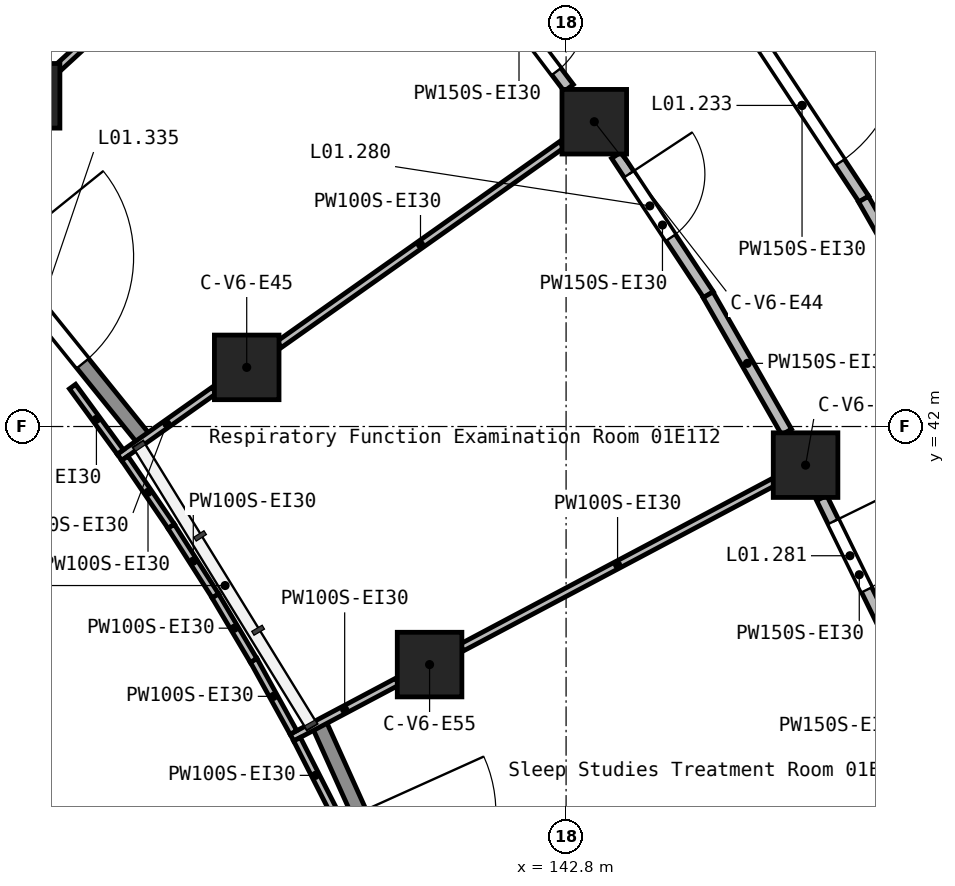
"""IFC4 building model, lengths in metres.
Left out: names, types, materials, properties, quantities, classifications, styles, units other than length and angle.
Written with IfcOpenShell. Run it as: python <this file> out.ifc"""

import sys

from ifc_helpers import new_model, si_unit, direction, frame, frame_2d, origin, origin_2d, place, context, subcontext, project, spatial, rectangle, extrude, element, fill, save


model = new_model("IFC4")
c1 = context("Model", 3, precision=1e-05, world=origin(), true_north=direction((0.0, 1.0)))
c2 = subcontext(c1, "Body", "Model", "MODEL_VIEW")
j1 = project(units=[si_unit("LENGTHUNIT", "METRE"), si_unit("PLANEANGLEUNIT", "RADIAN")], contexts=[c1])
p1 = place(None, origin())
s1 = spatial("IfcSite", under=j1, at=p1, CompositionType="ELEMENT")
p2 = place(p1, origin())
s2 = spatial("IfcBuilding", under=s1, at=p2, CompositionType="ELEMENT")
p3 = place(p2, frame((0.0, 0.0, 5.4)))
s3 = spatial("IfcBuildingStorey", under=s2, at=p3, CompositionType="ELEMENT", Elevation=5.4)
for number, where, z_axis, x_axis in (
    (1, (135.715, 46.351, 0.0), (0.0, 0.0, 1.0), (1.0, 0.0, 0.0)),
    (2, (138.598, 42.778, 0.0), (0.0, 0.0, 1.0), (1.0, 0.0, 0.0)),
    (3, (141.004, 38.868, 0.0), (0.0, 0.0, 1.0), (1.0, 0.0, 0.0)),
    (4, (143.171, 46.01, 0.0), (0.0, 0.0, 1.0), (1.0, 0.0, 0.0)),
    (5, (145.951, 41.492, 0.0), (0.0, 0.0, 1.0), (1.0, 0.0, 0.0)),
):
    element("IfcColumn", number, at=place(p3, frame(where, z_axis=z_axis, x_axis=x_axis)), inside=s3, PredefinedType="COLUMN", context=c2, shape_type="SweptSolid", body=[
        extrude(rectangle(XDim=0.85, YDim=0.85, at=origin_2d()), origin(), (0.0, 0.0, 1.0), 4.5),
    ])
p4 = place(p3, frame((134.504, 45.23, 0.0), z_axis=(0.0, 0.0, 1.0), x_axis=(0.628043022297, -0.778178618406, 0.0)))
e6 = element("IfcWall", 6, at=p4, inside=s3, PredefinedType="STANDARD", context=c2, shape_type="SweptSolid", body=[
    extrude(rectangle(XDim=4.368, YDim=0.2, at=frame_2d((2.184, 0.0))), origin(), (0.0, 0.0, 1.0), 3.35),
])
p5 = place(p4, frame((1.284, 0.0, 0.0)))
e7 = element("IfcOpeningElement", 7, at=p5, cuts=e6, PredefinedType="OPENING", context=c2, shape_type="SweptSolid", body=[
    extrude(rectangle(XDim=1.8, YDim=2.4, at=frame_2d((0.9, 1.2))), frame((0.0, 0.11, 0.0), z_axis=(0.0, -1.0, 0.0), x_axis=(1.0, 0.0, 0.0)), (0.0, 0.0, 1.0), 0.22),
])
p6 = place(p3, frame((139.549, 38.089, 0.0), z_axis=(0.0, 0.0, 1.0), x_axis=(0.411110484999, -0.911585524854, 0.0)))
e8 = element("IfcWall", 8, at=p6, inside=s3, PredefinedType="STANDARD", context=c2, shape_type="SweptSolid", body=[
    extrude(rectangle(XDim=4.368, YDim=0.2, at=frame_2d((2.184, 0.0))), origin(), (0.0, 0.0, 1.0), 3.35),
])
p7 = place(p6, frame((1.284, 0.0, 0.0)))
e9 = element("IfcOpeningElement", 9, at=p7, cuts=e8, PredefinedType="OPENING", context=c2, shape_type="SweptSolid", body=[
    extrude(rectangle(XDim=1.8, YDim=2.4, at=frame_2d((0.9, 1.2))), frame((0.0, 0.11, 0.0), z_axis=(0.0, -1.0, 0.0), x_axis=(1.0, 0.0, 0.0)), (0.0, 0.0, 1.0), 0.22),
])
p8 = place(p3, frame((145.09, 47.458, 0.0), z_axis=(0.0, 0.0, 1.0), x_axis=(0.551018151494, -0.834493257447, 0.0)))
e10 = element("IfcWall", 10, at=p8, inside=s3, PredefinedType="PARTITIONING", context=c2, shape_type="SweptSolid", body=[
    extrude(rectangle(XDim=2.958, YDim=0.15, at=frame_2d((1.479, 0.0))), origin(), (0.0, 0.0, 1.0), 4.15),
])
p9 = place(p8, frame((0.579, 0.0, 0.0)))
e11 = element("IfcOpeningElement", 11, at=p9, cuts=e10, PredefinedType="OPENING", context=c2, shape_type="SweptSolid", body=[
    extrude(rectangle(XDim=1.8, YDim=2.1, at=frame_2d((0.9, 1.05))), frame((0.0, 0.085, 0.0), z_axis=(0.0, -1.0, 0.0), x_axis=(1.0, 0.0, 0.0)), (0.0, 0.0, 1.0), 0.17),
])
p10 = place(p3, frame((146.713, 44.992, 0.0), z_axis=(0.0, 0.0, 1.0), x_axis=(0.49622768999, -0.868192420888, 0.0)))
e12 = element("IfcWall", 12, at=p10, inside=s3, PredefinedType="PARTITIONING", context=c2, shape_type="SweptSolid", body=[
    extrude(rectangle(XDim=2.666, YDim=0.15, at=frame_2d((1.333, 0.0))), origin(), (0.0, 0.0, 1.0), 4.15),
])
p11 = place(p3, frame((146.163, 41.06, 0.0), z_axis=(0.0, 0.0, 1.0), x_axis=(0.439946079235, -0.898024190858, 0.0)))
e13 = element("IfcWall", 13, at=p11, inside=s3, PredefinedType="PARTITIONING", context=c2, shape_type="SweptSolid", body=[
    extrude(rectangle(XDim=2.249, YDim=0.15, at=frame_2d((1.124, 0.0))), origin(), (0.0, 0.0, 1.0), 4.15),
])
p12 = place(p11, frame((0.346, 0.0, 0.0)))
e14 = element("IfcOpeningElement", 14, at=p12, cuts=e13, PredefinedType="OPENING", context=c2, shape_type="SweptSolid", body=[
    extrude(rectangle(XDim=1.0, YDim=2.1, at=frame_2d((0.5, 1.05))), frame((0.0, 0.085, 0.0), z_axis=(0.0, -1.0, 0.0), x_axis=(1.0, 0.0, 0.0)), (0.0, 0.0, 1.0), 0.17),
])
p13 = place(p3, frame((141.526, 48.188, 0.0), z_axis=(0.0, 0.0, 1.0), x_axis=(0.60280129331, -0.797891346477, 0.0)))
e15 = element("IfcWall", 15, at=p13, inside=s3, PredefinedType="PARTITIONING", context=c2, shape_type="SweptSolid", body=[
    extrude(rectangle(XDim=2.172, YDim=0.15, at=frame_2d((1.086, 0.0))), origin(), (0.0, 0.0, 1.0), 4.15),
])
p14 = place(p13, frame((0.902, 0.0, 0.0)))
e16 = element("IfcOpeningElement", 16, at=p14, cuts=e15, PredefinedType="OPENING", context=c2, shape_type="SweptSolid", body=[
    extrude(rectangle(XDim=1.0, YDim=2.1, at=frame_2d((0.5, 1.05))), frame((0.0, 0.085, 0.0), z_axis=(0.0, -1.0, 0.0), x_axis=(1.0, 0.0, 0.0)), (0.0, 0.0, 1.0), 0.17),
])
p15 = place(p3, frame((143.462, 45.57, 0.0), z_axis=(0.0, 0.0, 1.0), x_axis=(0.550880835548, -0.834583911315, 0.0)))
e17 = element("IfcWall", 17, at=p15, inside=s3, PredefinedType="PARTITIONING", context=c2, shape_type="SweptSolid", body=[
    extrude(rectangle(XDim=2.201, YDim=0.15, at=frame_2d((1.101, 0.0))), origin(), (0.0, 0.0, 1.0), 4.15),
])
p16 = place(p15, frame((0.299, 0.0, 0.0)))
e18 = element("IfcOpeningElement", 18, at=p16, cuts=e17, PredefinedType="OPENING", context=c2, shape_type="SweptSolid", body=[
    extrude(rectangle(XDim=1.0, YDim=2.1, at=frame_2d((0.5, 1.05))), frame((0.0, 0.085, 0.0), z_axis=(0.0, -1.0, 0.0), x_axis=(1.0, 0.0, 0.0)), (0.0, 0.0, 1.0), 0.17),
])
p17 = place(p3, frame((144.668, 43.734, 0.0), z_axis=(0.0, 0.0, 1.0), x_axis=(0.496694973164, -0.867925171679, 0.0)))
e19 = element("IfcWall", 19, at=p17, inside=s3, PredefinedType="PARTITIONING", context=c2, shape_type="SweptSolid", body=[
    extrude(rectangle(XDim=2.08, YDim=0.15, at=frame_2d((1.04, 0.0))), origin(), (0.0, 0.0, 1.0), 4.15),
])
p18 = place(p3, frame((139.193, 37.908, 0.0), z_axis=(0.0, 0.0, 1.0), x_axis=(0.883481589726, 0.468465879884, 0.0)))
e20 = element("IfcWall", 20, at=p18, inside=s3, PredefinedType="PARTITIONING", context=c2, shape_type="SweptSolid", body=[
    extrude(rectangle(XDim=1.571, YDim=0.1, at=frame_2d((0.786, 0.0))), origin(), (0.0, 0.0, 1.0), 4.15),
])
p19 = place(p3, frame((141.427, 39.093, 0.0), z_axis=(0.0, 0.0, 1.0), x_axis=(0.88344099274, 0.46854243388, 0.0)))
e21 = element("IfcWall", 21, at=p19, inside=s3, PredefinedType="PARTITIONING", context=c2, shape_type="SweptSolid", body=[
    extrude(rectangle(XDim=4.642, YDim=0.1, at=frame_2d((2.321, 0.0))), origin(), (0.0, 0.0, 1.0), 4.15),
])
p20 = place(p3, frame((136.924, 41.595, 0.0), z_axis=(0.0, 0.0, 1.0), x_axis=(0.816643847366, 0.577141946629, 0.0)))
e22 = element("IfcWall", 22, at=p20, inside=s3, PredefinedType="PARTITIONING", context=c2, shape_type="SweptSolid", body=[
    extrude(rectangle(XDim=1.525, YDim=0.1, at=frame_2d((0.762, 0.0))), origin(), (0.0, 0.0, 1.0), 4.15),
])
p21 = place(p3, frame((139.026, 43.081, 0.0), z_axis=(0.0, 0.0, 1.0), x_axis=(0.816637661001, 0.577150700108, 0.0)))
e23 = element("IfcWall", 23, at=p21, inside=s3, PredefinedType="PARTITIONING", context=c2, shape_type="SweptSolid", body=[
    extrude(rectangle(XDim=4.551, YDim=0.1, at=frame_2d((2.275, 0.0))), origin(), (0.0, 0.0, 1.0), 4.15),
])
p22 = place(p3, frame((136.111, 46.715, 0.0), z_axis=(0.0, 0.0, 1.0), x_axis=(0.736475017651, 0.676464742892, 0.0)))
e24 = element("IfcWall", 24, at=p22, inside=s3, PredefinedType="PARTITIONING", context=c2, shape_type="SweptSolid", body=[
    extrude(rectangle(XDim=4.524, YDim=0.1, at=frame_2d((2.262, 0.0))), origin(), (0.0, 0.0, 1.0), 4.15),
])
p23 = place(p3, frame((139.26, 37.886, 0.0), z_axis=(0.0, 0.0, 1.0), x_axis=(0.454251585092, -0.890873446367, 0.0)))
e25 = element("IfcWall", 25, at=p23, inside=s3, PredefinedType="PARTITIONING", context=c2, shape_type="SweptSolid", body=[
    extrude(rectangle(XDim=1.066, YDim=0.1, at=frame_2d((0.533, 0.0))), origin(), (0.0, 0.0, 1.0), 4.15),
])
p24 = place(p3, frame((136.994, 41.582, 0.0), z_axis=(0.0, 0.0, 1.0), x_axis=(0.564070256428, -0.825726798532, 0.0)))
e26 = element("IfcWall", 26, at=p24, inside=s3, PredefinedType="PARTITIONING", context=c2, shape_type="SweptSolid", body=[
    extrude(rectangle(XDim=1.084, YDim=0.1, at=frame_2d((0.542, 0.0))), origin(), (0.0, 0.0, 1.0), 4.15),
])
p25 = place(p3, frame((137.603, 40.687, 0.0), z_axis=(0.0, 0.0, 1.0), x_axis=(0.53747146193, -0.843281938388, 0.0)))
e27 = element("IfcWall", 27, at=p25, inside=s3, PredefinedType="PARTITIONING", context=c2, shape_type="SweptSolid", body=[
    extrude(rectangle(XDim=1.086, YDim=0.1, at=frame_2d((0.543, 0.0))), origin(), (0.0, 0.0, 1.0), 4.15),
])
p26 = place(p3, frame((138.689, 38.925, 0.0), z_axis=(0.0, 0.0, 1.0), x_axis=(0.482886802116, -0.875682782942, 0.0)))
e28 = element("IfcWall", 28, at=p26, inside=s3, PredefinedType="PARTITIONING", context=c2, shape_type="SweptSolid", body=[
    extrude(rectangle(XDim=1.084, YDim=0.1, at=frame_2d((0.542, 0.0))), origin(), (0.0, 0.0, 1.0), 4.15),
])
p27 = place(p3, frame((136.306, 42.526, 0.0), z_axis=(0.0, 0.0, 1.0), x_axis=(0.590022332041, -0.807386925639, 0.0)))
e29 = element("IfcWall", 29, at=p27, inside=s3, PredefinedType="PARTITIONING", context=c2, shape_type="SweptSolid", body=[
    extrude(rectangle(XDim=1.066, YDim=0.1, at=frame_2d((0.533, 0.0))), origin(), (0.0, 0.0, 1.0), 4.15),
])
p28 = place(p3, frame((138.185, 39.771, 0.0), z_axis=(0.0, 0.0, 1.0), x_axis=(0.51019570921, -0.860058334245, 0.0)))
e30 = element("IfcWall", 30, at=p28, inside=s3, PredefinedType="PARTITIONING", context=c2, shape_type="SweptSolid", body=[
    extrude(rectangle(XDim=0.987, YDim=0.1, at=frame_2d((0.493, 0.0))), origin(), (0.0, 0.0, 1.0), 4.15),
])
p29 = place(p5, origin())
e31 = element("IfcDoor", 31, at=p29, inside=s3, OperationType="SINGLE_SWING_LEFT", PredefinedType="DOOR", context=c2, shape_type="SweptSolid", body=[
    extrude(rectangle(XDim=1.8, YDim=2.4, at=frame_2d((0.9, 1.2))), frame((0.0, 0.025, 0.0), z_axis=(0.0, -1.0, 0.0), x_axis=(1.0, 0.0, 0.0)), (0.0, 0.0, 1.0), 0.05),
])
fill(e7, e31)
p30 = place(p9, frame((1.8, 0.0, 0.0), z_axis=(0.0, 0.0, 1.0), x_axis=(-1.0, 0.0, 0.0)))
e32 = element("IfcDoor", 32, at=p30, inside=s3, OperationType="DOUBLE_DOOR_SINGLE_SWING", PredefinedType="DOOR", context=c2, shape_type="SweptSolid", body=[
    extrude(rectangle(XDim=1.8, YDim=2.1, at=frame_2d((0.9, 1.05))), frame((0.0, 0.025, 0.0), z_axis=(0.0, -1.0, 0.0), x_axis=(1.0, 0.0, 0.0)), (0.0, 0.0, 1.0), 0.05),
])
fill(e11, e32)
p31 = place(p14, frame((1.0, 0.0, 0.0), z_axis=(0.0, 0.0, 1.0), x_axis=(-1.0, 0.0, 0.0)))
e33 = element("IfcDoor", 33, at=p31, inside=s3, OperationType="SINGLE_SWING_LEFT", PredefinedType="DOOR", context=c2, shape_type="SweptSolid", body=[
    extrude(rectangle(XDim=1.0, YDim=2.1, at=frame_2d((0.5, 1.05))), frame((0.0, 0.025, 0.0), z_axis=(0.0, -1.0, 0.0), x_axis=(1.0, 0.0, 0.0)), (0.0, 0.0, 1.0), 0.05),
])
fill(e16, e33)
p32 = place(p16, frame((1.0, 0.0, 0.0), z_axis=(0.0, 0.0, 1.0), x_axis=(-1.0, 0.0, 0.0)))
e34 = element("IfcDoor", 34, at=p32, inside=s3, OperationType="SINGLE_SWING_RIGHT", PredefinedType="DOOR", context=c2, shape_type="SweptSolid", body=[
    extrude(rectangle(XDim=1.0, YDim=2.1, at=frame_2d((0.5, 1.05))), frame((0.0, 0.025, 0.0), z_axis=(0.0, -1.0, 0.0), x_axis=(1.0, 0.0, 0.0)), (0.0, 0.0, 1.0), 0.05),
])
fill(e18, e34)
p33 = place(p12, frame((1.0, 0.0, 0.0), z_axis=(0.0, 0.0, 1.0), x_axis=(-1.0, 0.0, 0.0)))
e35 = element("IfcDoor", 35, at=p33, inside=s3, OperationType="SINGLE_SWING_RIGHT", PredefinedType="DOOR", context=c2, shape_type="SweptSolid", body=[
    extrude(rectangle(XDim=1.0, YDim=2.1, at=frame_2d((0.5, 1.05))), frame((0.0, 0.025, 0.0), z_axis=(0.0, -1.0, 0.0), x_axis=(1.0, 0.0, 0.0)), (0.0, 0.0, 1.0), 0.05),
])
fill(e14, e35)
save(model, sys.argv[1])
